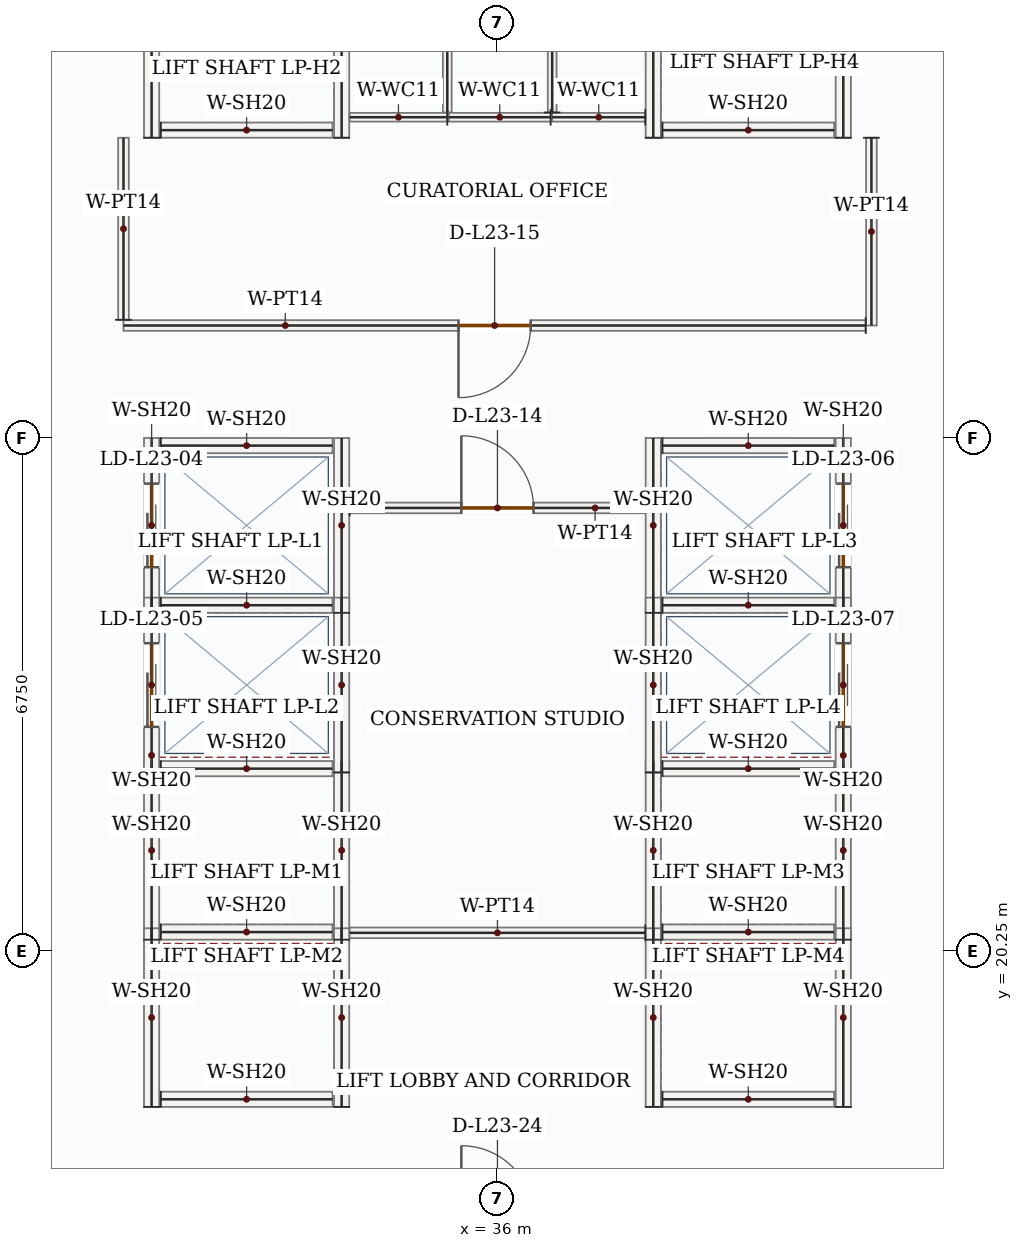
"""IFC4 building model, lengths in metres.
Left out: names, types, materials, properties, quantities, classifications, styles, units other than length and angle.
Written with IfcOpenShell. Run it as: python <this file> out.ifc"""

import sys

from ifc_helpers import new_model, si_unit, direction, frame, frame_2d, origin, place, context, subcontext, project, spatial, rectangle, extrude, source, transform, mapped, element, fill, save


model = new_model("IFC4")
c1 = context("Model", 3, precision=1e-05, world=origin(), true_north=direction((0.0, 1.0)))
c2 = subcontext(c1, "Body", "Model", "MODEL_VIEW")
j1 = project(units=[si_unit("LENGTHUNIT", "METRE"), si_unit("PLANEANGLEUNIT", "RADIAN")], contexts=[c1])
p1 = place(None, origin())
s1 = spatial("IfcSite", under=j1, at=p1, CompositionType="ELEMENT")
p2 = place(p1, origin())
s2 = spatial("IfcBuilding", under=s1, at=p2, CompositionType="ELEMENT")
p3 = place(p2, frame((0.0, 0.0, 104.7)))
s3 = spatial("IfcBuildingStorey", under=s2, at=p3, CompositionType="ELEMENT", Elevation=104.7)
m1 = source(origin(), c2, "Body", "SweptSolid", [
    extrude(rectangle(XDim=2.4, YDim=0.2, at=frame_2d((1.2, 0.0))), origin(), (0.0, 0.0, 1.0), 3.95),
])
for number, where, z_axis, x_axis in (
    (1, (31.45, 30.95, 0.0), (0.0, 0.0, 1.0), (0.0, 1.0, 0.0)),
    (2, (33.95, 30.95, 0.0), (0.0, 0.0, 1.0), (0.0, 1.0, 0.0)),
):
    element("IfcWall", number, at=place(p3, frame(where, z_axis=z_axis, x_axis=x_axis)), inside=s3, PredefinedType="SOLIDWALL", context=c2, shape_type="MappedRepresentation", body=[
        mapped(m1, transform((0.0, 0.0, 0.0), x_axis=(1.0, 0.0, 0.0), y_axis=(0.0, 1.0, 0.0), z_axis=(0.0, 0.0, 1.0), scale=1.0)),
    ])
m2 = source(origin(), c2, "Body", "SweptSolid", [
    extrude(rectangle(XDim=2.26, YDim=0.2, at=frame_2d((1.13, 0.0))), origin(), (0.0, 0.0, 1.0), 3.95),
])
p4 = place(p3, frame((31.57, 31.05, 0.0), z_axis=(0.0, 0.0, 1.0), x_axis=(1.0, 0.0, 0.0)))
e3 = element("IfcWall", 3, at=p4, inside=s3, PredefinedType="SOLIDWALL", context=c2, shape_type="MappedRepresentation", body=[
    mapped(m2, transform((0.0, 0.0, 0.0), x_axis=(1.0, 0.0, 0.0), y_axis=(0.0, 1.0, 0.0), z_axis=(0.0, 0.0, 1.0), scale=1.0)),
])
for number, where, z_axis, x_axis in (
    (4, (38.05, 30.95, 0.0), (0.0, 0.0, 1.0), (0.0, 1.0, 0.0)),
    (5, (40.55, 30.95, 0.0), (0.0, 0.0, 1.0), (0.0, 1.0, 0.0)),
):
    element("IfcWall", number, at=place(p3, frame(where, z_axis=z_axis, x_axis=x_axis)), inside=s3, PredefinedType="SOLIDWALL", context=c2, shape_type="MappedRepresentation", body=[
        mapped(m1, transform((0.0, 0.0, 0.0), x_axis=(1.0, 0.0, 0.0), y_axis=(0.0, 1.0, 0.0), z_axis=(0.0, 0.0, 1.0), scale=1.0)),
    ])
p5 = place(p3, frame((38.17, 31.05, 0.0), z_axis=(0.0, 0.0, 1.0), x_axis=(1.0, 0.0, 0.0)))
e6 = element("IfcWall", 6, at=p5, inside=s3, PredefinedType="SOLIDWALL", context=c2, shape_type="MappedRepresentation", body=[
    mapped(m2, transform((0.0, 0.0, 0.0), x_axis=(1.0, 0.0, 0.0), y_axis=(0.0, 1.0, 0.0), z_axis=(0.0, 0.0, 1.0), scale=1.0)),
])
m3 = source(origin(), c2, "Body", "SweptSolid", [
    extrude(rectangle(XDim=2.35, YDim=0.2, at=frame_2d((1.175, 0.0))), origin(), (0.0, 0.0, 1.0), 3.95),
])
for number, where, z_axis, x_axis in (
    (7, (31.45, 20.4, 0.0), (0.0, 0.0, 1.0), (0.0, 1.0, 0.0)),
    (8, (33.95, 20.4, 0.0), (0.0, 0.0, 1.0), (0.0, 1.0, 0.0)),
):
    element("IfcWall", number, at=place(p3, frame(where, z_axis=z_axis, x_axis=x_axis)), inside=s3, PredefinedType="SOLIDWALL", context=c2, shape_type="MappedRepresentation", body=[
        mapped(m3, transform((0.0, 0.0, 0.0), x_axis=(1.0, 0.0, 0.0), y_axis=(0.0, 1.0, 0.0), z_axis=(0.0, 0.0, 1.0), scale=1.0)),
    ])
for number, where, z_axis, x_axis in (
    (9, (31.57, 20.5, 0.0), (0.0, 0.0, 1.0), (1.0, 0.0, 0.0)),
    (10, (31.57, 22.65, 0.0), (0.0, 0.0, 1.0), (1.0, 0.0, 0.0)),
):
    element("IfcWall", number, at=place(p3, frame(where, z_axis=z_axis, x_axis=x_axis)), inside=s3, PredefinedType="SOLIDWALL", context=c2, shape_type="MappedRepresentation", body=[
        mapped(m2, transform((0.0, 0.0, 0.0), x_axis=(1.0, 0.0, 0.0), y_axis=(0.0, 1.0, 0.0), z_axis=(0.0, 0.0, 1.0), scale=1.0)),
    ])
for number, where, z_axis, x_axis in (
    (11, (31.45, 18.2, 0.0), (0.0, 0.0, 1.0), (0.0, 1.0, 0.0)),
    (12, (33.95, 18.2, 0.0), (0.0, 0.0, 1.0), (0.0, 1.0, 0.0)),
):
    element("IfcWall", number, at=place(p3, frame(where, z_axis=z_axis, x_axis=x_axis)), inside=s3, PredefinedType="SOLIDWALL", context=c2, shape_type="MappedRepresentation", body=[
        mapped(m3, transform((0.0, 0.0, 0.0), x_axis=(1.0, 0.0, 0.0), y_axis=(0.0, 1.0, 0.0), z_axis=(0.0, 0.0, 1.0), scale=1.0)),
    ])
p6 = place(p3, frame((31.57, 18.3, 0.0), z_axis=(0.0, 0.0, 1.0), x_axis=(1.0, 0.0, 0.0)))
e13 = element("IfcWall", 13, at=p6, inside=s3, PredefinedType="SOLIDWALL", context=c2, shape_type="MappedRepresentation", body=[
    mapped(m2, transform((0.0, 0.0, 0.0), x_axis=(1.0, 0.0, 0.0), y_axis=(0.0, 1.0, 0.0), z_axis=(0.0, 0.0, 1.0), scale=1.0)),
])
for number, where, z_axis, x_axis in (
    (14, (38.05, 20.4, 0.0), (0.0, 0.0, 1.0), (0.0, 1.0, 0.0)),
    (15, (40.55, 20.4, 0.0), (0.0, 0.0, 1.0), (0.0, 1.0, 0.0)),
):
    element("IfcWall", number, at=place(p3, frame(where, z_axis=z_axis, x_axis=x_axis)), inside=s3, PredefinedType="SOLIDWALL", context=c2, shape_type="MappedRepresentation", body=[
        mapped(m3, transform((0.0, 0.0, 0.0), x_axis=(1.0, 0.0, 0.0), y_axis=(0.0, 1.0, 0.0), z_axis=(0.0, 0.0, 1.0), scale=1.0)),
    ])
for number, where, z_axis, x_axis in (
    (16, (38.17, 20.5, 0.0), (0.0, 0.0, 1.0), (1.0, 0.0, 0.0)),
    (17, (38.17, 22.65, 0.0), (0.0, 0.0, 1.0), (1.0, 0.0, 0.0)),
):
    element("IfcWall", number, at=place(p3, frame(where, z_axis=z_axis, x_axis=x_axis)), inside=s3, PredefinedType="SOLIDWALL", context=c2, shape_type="MappedRepresentation", body=[
        mapped(m2, transform((0.0, 0.0, 0.0), x_axis=(1.0, 0.0, 0.0), y_axis=(0.0, 1.0, 0.0), z_axis=(0.0, 0.0, 1.0), scale=1.0)),
    ])
for number, where, z_axis, x_axis in (
    (18, (38.05, 18.2, 0.0), (0.0, 0.0, 1.0), (0.0, 1.0, 0.0)),
    (19, (40.55, 18.2, 0.0), (0.0, 0.0, 1.0), (0.0, 1.0, 0.0)),
):
    element("IfcWall", number, at=place(p3, frame(where, z_axis=z_axis, x_axis=x_axis)), inside=s3, PredefinedType="SOLIDWALL", context=c2, shape_type="MappedRepresentation", body=[
        mapped(m3, transform((0.0, 0.0, 0.0), x_axis=(1.0, 0.0, 0.0), y_axis=(0.0, 1.0, 0.0), z_axis=(0.0, 0.0, 1.0), scale=1.0)),
    ])
p7 = place(p3, frame((38.17, 18.3, 0.0), z_axis=(0.0, 0.0, 1.0), x_axis=(1.0, 0.0, 0.0)))
e20 = element("IfcWall", 20, at=p7, inside=s3, PredefinedType="SOLIDWALL", context=c2, shape_type="MappedRepresentation", body=[
    mapped(m2, transform((0.0, 0.0, 0.0), x_axis=(1.0, 0.0, 0.0), y_axis=(0.0, 1.0, 0.0), z_axis=(0.0, 0.0, 1.0), scale=1.0)),
])
p8 = place(p3, frame((31.45, 24.7, 0.0), z_axis=(0.0, 0.0, 1.0), x_axis=(0.0, 1.0, 0.0)))
e21 = element("IfcWall", 21, at=p8, inside=s3, PredefinedType="SOLIDWALL", context=c2, shape_type="SweptSolid", body=[
    extrude(rectangle(XDim=2.3, YDim=0.2, at=frame_2d((1.15, 0.0))), origin(), (0.0, 0.0, 1.0), 3.95),
])
p9 = place(p8, frame((0.6, 0.0, 0.0)))
e22 = element("IfcOpeningElement", 22, at=p9, cuts=e21, PredefinedType="OPENING", context=c2, shape_type="SweptSolid", body=[
    extrude(rectangle(XDim=1.1, YDim=2.15, at=frame_2d((0.55, 1.075))), frame((0.0, 0.11, 0.0), z_axis=(0.0, -1.0, 0.0), x_axis=(1.0, 0.0, 0.0)), (0.0, 0.0, 1.0), 0.22),
])
m4 = source(origin(), c2, "Body", "SweptSolid", [
    extrude(rectangle(XDim=2.3, YDim=0.2, at=frame_2d((1.15, 0.0))), origin(), (0.0, 0.0, 1.0), 3.95),
])
p10 = place(p3, frame((33.95, 24.7, 0.0), z_axis=(0.0, 0.0, 1.0), x_axis=(0.0, 1.0, 0.0)))
e23 = element("IfcWall", 23, at=p10, inside=s3, PredefinedType="SOLIDWALL", context=c2, shape_type="MappedRepresentation", body=[
    mapped(m4, transform((0.0, 0.0, 0.0), x_axis=(1.0, 0.0, 0.0), y_axis=(0.0, 1.0, 0.0), z_axis=(0.0, 0.0, 1.0), scale=1.0)),
])
for number, where, z_axis, x_axis in (
    (24, (31.57, 24.8, 0.0), (0.0, 0.0, 1.0), (1.0, 0.0, 0.0)),
    (25, (31.57, 26.9, 0.0), (0.0, 0.0, 1.0), (1.0, 0.0, 0.0)),
):
    element("IfcWall", number, at=place(p3, frame(where, z_axis=z_axis, x_axis=x_axis)), inside=s3, PredefinedType="SOLIDWALL", context=c2, shape_type="MappedRepresentation", body=[
        mapped(m2, transform((0.0, 0.0, 0.0), x_axis=(1.0, 0.0, 0.0), y_axis=(0.0, 1.0, 0.0), z_axis=(0.0, 0.0, 1.0), scale=1.0)),
    ])
p11 = place(p3, frame((31.45, 22.6, 0.0), z_axis=(0.0, 0.0, 1.0), x_axis=(0.0, 1.0, 0.0)))
e26 = element("IfcWall", 26, at=p11, inside=s3, PredefinedType="SOLIDWALL", context=c2, shape_type="SweptSolid", body=[
    extrude(rectangle(XDim=2.3, YDim=0.2, at=frame_2d((1.15, 0.0))), origin(), (0.0, 0.0, 1.0), 3.95),
])
p12 = place(p11, frame((0.6, 0.0, 0.0)))
e27 = element("IfcOpeningElement", 27, at=p12, cuts=e26, PredefinedType="OPENING", context=c2, shape_type="SweptSolid", body=[
    extrude(rectangle(XDim=1.1, YDim=2.15, at=frame_2d((0.55, 1.075))), frame((0.0, 0.11, 0.0), z_axis=(0.0, -1.0, 0.0), x_axis=(1.0, 0.0, 0.0)), (0.0, 0.0, 1.0), 0.22),
])
m5 = source(origin(), c2, "Body", "SweptSolid", [
    extrude(rectangle(XDim=2.3, YDim=0.2, at=frame_2d((1.15, 0.0))), origin(), (0.0, 0.0, 1.0), 3.95),
])
p13 = place(p3, frame((33.95, 22.6, 0.0), z_axis=(0.0, 0.0, 1.0), x_axis=(0.0, 1.0, 0.0)))
e28 = element("IfcWall", 28, at=p13, inside=s3, PredefinedType="SOLIDWALL", context=c2, shape_type="MappedRepresentation", body=[
    mapped(m5, transform((0.0, 0.0, 0.0), x_axis=(1.0, 0.0, 0.0), y_axis=(0.0, 1.0, 0.0), z_axis=(0.0, 0.0, 1.0), scale=1.0)),
])
p14 = place(p3, frame((38.05, 24.7, 0.0), z_axis=(0.0, 0.0, 1.0), x_axis=(0.0, 1.0, 0.0)))
e29 = element("IfcWall", 29, at=p14, inside=s3, PredefinedType="SOLIDWALL", context=c2, shape_type="MappedRepresentation", body=[
    mapped(m4, transform((0.0, 0.0, 0.0), x_axis=(1.0, 0.0, 0.0), y_axis=(0.0, 1.0, 0.0), z_axis=(0.0, 0.0, 1.0), scale=1.0)),
])
p15 = place(p3, frame((40.55, 24.7, 0.0), z_axis=(0.0, 0.0, 1.0), x_axis=(0.0, 1.0, 0.0)))
e30 = element("IfcWall", 30, at=p15, inside=s3, PredefinedType="SOLIDWALL", context=c2, shape_type="SweptSolid", body=[
    extrude(rectangle(XDim=2.3, YDim=0.2, at=frame_2d((1.15, 0.0))), origin(), (0.0, 0.0, 1.0), 3.95),
])
p16 = place(p15, frame((0.6, 0.0, 0.0)))
e31 = element("IfcOpeningElement", 31, at=p16, cuts=e30, PredefinedType="OPENING", context=c2, shape_type="SweptSolid", body=[
    extrude(rectangle(XDim=1.1, YDim=2.15, at=frame_2d((0.55, 1.075))), frame((0.0, 0.11, 0.0), z_axis=(0.0, -1.0, 0.0), x_axis=(1.0, 0.0, 0.0)), (0.0, 0.0, 1.0), 0.22),
])
for number, where, z_axis, x_axis in (
    (32, (38.17, 24.8, 0.0), (0.0, 0.0, 1.0), (1.0, 0.0, 0.0)),
    (33, (38.17, 26.9, 0.0), (0.0, 0.0, 1.0), (1.0, 0.0, 0.0)),
):
    element("IfcWall", number, at=place(p3, frame(where, z_axis=z_axis, x_axis=x_axis)), inside=s3, PredefinedType="SOLIDWALL", context=c2, shape_type="MappedRepresentation", body=[
        mapped(m2, transform((0.0, 0.0, 0.0), x_axis=(1.0, 0.0, 0.0), y_axis=(0.0, 1.0, 0.0), z_axis=(0.0, 0.0, 1.0), scale=1.0)),
    ])
p17 = place(p3, frame((38.05, 22.6, 0.0), z_axis=(0.0, 0.0, 1.0), x_axis=(0.0, 1.0, 0.0)))
e34 = element("IfcWall", 34, at=p17, inside=s3, PredefinedType="SOLIDWALL", context=c2, shape_type="MappedRepresentation", body=[
    mapped(m5, transform((0.0, 0.0, 0.0), x_axis=(1.0, 0.0, 0.0), y_axis=(0.0, 1.0, 0.0), z_axis=(0.0, 0.0, 1.0), scale=1.0)),
])
p18 = place(p3, frame((40.55, 22.6, 0.0), z_axis=(0.0, 0.0, 1.0), x_axis=(0.0, 1.0, 0.0)))
e35 = element("IfcWall", 35, at=p18, inside=s3, PredefinedType="SOLIDWALL", context=c2, shape_type="SweptSolid", body=[
    extrude(rectangle(XDim=2.3, YDim=0.2, at=frame_2d((1.15, 0.0))), origin(), (0.0, 0.0, 1.0), 3.95),
])
p19 = place(p18, frame((0.6, 0.0, 0.0)))
e36 = element("IfcOpeningElement", 36, at=p19, cuts=e35, PredefinedType="OPENING", context=c2, shape_type="SweptSolid", body=[
    extrude(rectangle(XDim=1.1, YDim=2.15, at=frame_2d((0.55, 1.075))), frame((0.0, 0.11, 0.0), z_axis=(0.0, -1.0, 0.0), x_axis=(1.0, 0.0, 0.0)), (0.0, 0.0, 1.0), 0.22),
])
m6 = source(origin(), c2, "Body", "SweptSolid", [
    extrude(rectangle(XDim=1.225, YDim=0.115, at=frame_2d((0.613, 0.0))), origin(), (0.0, 0.0, 1.0), 3.95),
])
p20 = place(p3, frame((37.945, 31.22, 0.0), z_axis=(0.0, 0.0, 1.0), x_axis=(-1.0, 0.0, 0.0)))
e37 = element("IfcWall", 37, at=p20, inside=s3, PredefinedType="PARTITIONING", context=c2, shape_type="MappedRepresentation", body=[
    mapped(m6, transform((0.0, 0.0, 0.0), x_axis=(1.0, 0.0, 0.0), y_axis=(0.0, 1.0, 0.0), z_axis=(0.0, 0.0, 1.0), scale=1.0)),
])
m7 = source(origin(), c2, "Body", "SweptSolid", [
    extrude(rectangle(XDim=3.998, YDim=0.115, at=frame_2d((1.999, 0.0))), origin(), (0.0, 0.0, 1.0), 3.95),
])
p21 = place(p3, frame((36.72, 31.282, 0.0), z_axis=(0.0, 0.0, 1.0), x_axis=(0.0, 1.0, 0.0)))
e38 = element("IfcWall", 38, at=p21, inside=s3, PredefinedType="PARTITIONING", context=c2, shape_type="MappedRepresentation", body=[
    mapped(m7, transform((0.0, 0.0, 0.0), x_axis=(1.0, 0.0, 0.0), y_axis=(0.0, 1.0, 0.0), z_axis=(0.0, 0.0, 1.0), scale=1.0)),
])
m8 = source(origin(), c2, "Body", "SweptSolid", [
    extrude(rectangle(XDim=1.285, YDim=0.115, at=frame_2d((0.643, 0.0))), origin(), (0.0, 0.0, 1.0), 3.95),
])
p22 = place(p3, frame((35.34, 31.22, 0.0), z_axis=(0.0, 0.0, 1.0), x_axis=(-1.0, 0.0, 0.0)))
e39 = element("IfcWall", 39, at=p22, inside=s3, PredefinedType="PARTITIONING", context=c2, shape_type="MappedRepresentation", body=[
    mapped(m8, transform((0.0, 0.0, 0.0), x_axis=(1.0, 0.0, 0.0), y_axis=(0.0, 1.0, 0.0), z_axis=(0.0, 0.0, 1.0), scale=1.0)),
])
m9 = source(origin(), c2, "Body", "SweptSolid", [
    extrude(rectangle(XDim=3.935, YDim=0.115, at=frame_2d((1.968, 0.0))), origin(), (0.0, 0.0, 1.0), 3.95),
])
p23 = place(p3, frame((35.34, 35.218, 0.0), z_axis=(0.0, 0.0, 1.0), x_axis=(0.0, -1.0, 0.0)))
e40 = element("IfcWall", 40, at=p23, inside=s3, PredefinedType="PARTITIONING", context=c2, shape_type="MappedRepresentation", body=[
    mapped(m9, transform((0.0, 0.0, 0.0), x_axis=(1.0, 0.0, 0.0), y_axis=(0.0, 1.0, 0.0), z_axis=(0.0, 0.0, 1.0), scale=1.0)),
])
m10 = source(origin(), c2, "Body", "SweptSolid", [
    extrude(rectangle(XDim=1.34, YDim=0.115, at=frame_2d((0.67, 0.0))), origin(), (0.0, 0.0, 1.0), 3.95),
])
p24 = place(p3, frame((36.7, 31.22, 0.0), z_axis=(0.0, 0.0, 1.0), x_axis=(-1.0, 0.0, 0.0)))
e41 = element("IfcWall", 41, at=p24, inside=s3, PredefinedType="PARTITIONING", context=c2, shape_type="MappedRepresentation", body=[
    mapped(m10, transform((0.0, 0.0, 0.0), x_axis=(1.0, 0.0, 0.0), y_axis=(0.0, 1.0, 0.0), z_axis=(0.0, 0.0, 1.0), scale=1.0)),
])
p25 = place(p3, frame((34.055, 26.08, 0.0), z_axis=(0.0, 0.0, 1.0), x_axis=(1.0, 0.0, 0.0)))
e42 = element("IfcWall", 42, at=p25, inside=s3, PredefinedType="PARTITIONING", context=c2, shape_type="SweptSolid", body=[
    extrude(rectangle(XDim=3.89, YDim=0.14, at=frame_2d((1.945, 0.0))), origin(), (0.0, 0.0, 1.0), 3.95),
])
p26 = place(p25, frame((1.47, 0.0, 0.0)))
e43 = element("IfcOpeningElement", 43, at=p26, cuts=e42, PredefinedType="OPENING", context=c2, shape_type="SweptSolid", body=[
    extrude(rectangle(XDim=0.95, YDim=2.15, at=frame_2d((0.475, 1.075))), frame((0.0, 0.08, 0.0), z_axis=(0.0, -1.0, 0.0), x_axis=(1.0, 0.0, 0.0)), (0.0, 0.0, 1.0), 0.16),
])
m11 = source(origin(), c2, "Body", "SweptSolid", [
    extrude(rectangle(XDim=3.89, YDim=0.14, at=frame_2d((1.945, 0.0))), origin(), (0.0, 0.0, 1.0), 3.95),
])
p27 = place(p3, frame((37.945, 20.49, 0.0), z_axis=(0.0, 0.0, 1.0), x_axis=(-1.0, 0.0, 0.0)))
e44 = element("IfcWall", 44, at=p27, inside=s3, PredefinedType="PARTITIONING", context=c2, shape_type="MappedRepresentation", body=[
    mapped(m11, transform((0.0, 0.0, 0.0), x_axis=(1.0, 0.0, 0.0), y_axis=(0.0, 1.0, 0.0), z_axis=(0.0, 0.0, 1.0), scale=1.0)),
])
m12 = source(origin(), c2, "Body", "SweptSolid", [
    extrude(rectangle(XDim=2.47, YDim=0.14, at=frame_2d((1.235, 0.0))), origin(), (0.0, 0.0, 1.0), 3.95),
])
p28 = place(p3, frame((40.92, 30.95, 0.0), z_axis=(0.0, 0.0, 1.0), x_axis=(0.0, -1.0, 0.0)))
e45 = element("IfcWall", 45, at=p28, inside=s3, PredefinedType="PARTITIONING", context=c2, shape_type="MappedRepresentation", body=[
    mapped(m12, transform((0.0, 0.0, 0.0), x_axis=(1.0, 0.0, 0.0), y_axis=(0.0, 1.0, 0.0), z_axis=(0.0, 0.0, 1.0), scale=1.0)),
])
p29 = place(p3, frame((40.845, 28.48, 0.0), z_axis=(0.0, 0.0, 1.0), x_axis=(-1.0, 0.0, 0.0)))
e46 = element("IfcWall", 46, at=p29, inside=s3, PredefinedType="PARTITIONING", context=c2, shape_type="SweptSolid", body=[
    extrude(rectangle(XDim=9.765, YDim=0.14, at=frame_2d((4.882, 0.0))), origin(), (0.0, 0.0, 1.0), 3.95),
])
p30 = place(p29, frame((4.407, 0.0, 0.0)))
e47 = element("IfcOpeningElement", 47, at=p30, cuts=e46, PredefinedType="OPENING", context=c2, shape_type="SweptSolid", body=[
    extrude(rectangle(XDim=0.95, YDim=2.15, at=frame_2d((0.475, 1.075))), frame((0.0, 0.08, 0.0), z_axis=(0.0, -1.0, 0.0), x_axis=(1.0, 0.0, 0.0)), (0.0, 0.0, 1.0), 0.16),
])
m13 = source(origin(), c2, "Body", "SweptSolid", [
    extrude(rectangle(XDim=2.395, YDim=0.14, at=frame_2d((1.198, 0.0))), origin(), (0.0, 0.0, 1.0), 3.95),
])
p31 = place(p3, frame((31.08, 28.555, 0.0), z_axis=(0.0, 0.0, 1.0), x_axis=(0.0, 1.0, 0.0)))
e48 = element("IfcWall", 48, at=p31, inside=s3, PredefinedType="PARTITIONING", context=c2, shape_type="MappedRepresentation", body=[
    mapped(m13, transform((0.0, 0.0, 0.0), x_axis=(1.0, 0.0, 0.0), y_axis=(0.0, 1.0, 0.0), z_axis=(0.0, 0.0, 1.0), scale=1.0)),
])
m14 = source(origin(), c2, "Body", "SweptSolid", [
    extrude(rectangle(XDim=1.1, YDim=2.15, at=frame_2d((0.55, 1.075))), frame((0.0, 0.025, 0.0), z_axis=(0.0, -1.0, 0.0), x_axis=(1.0, 0.0, 0.0)), (0.0, 0.0, 1.0), 0.05),
])
p32 = place(p9, origin())
e49 = element("IfcDoor", 49, at=p32, inside=s3, OperationType="DOUBLE_DOOR_SLIDING", PredefinedType="DOOR", context=c2, shape_type="MappedRepresentation", body=[
    mapped(m14, transform((0.0, 0.0, 0.0), x_axis=(1.0, 0.0, 0.0), y_axis=(0.0, 1.0, 0.0), z_axis=(0.0, 0.0, 1.0), scale=1.0)),
])
fill(e22, e49)
p33 = place(p12, origin())
e50 = element("IfcDoor", 50, at=p33, inside=s3, OperationType="DOUBLE_DOOR_SLIDING", PredefinedType="DOOR", context=c2, shape_type="MappedRepresentation", body=[
    mapped(m14, transform((0.0, 0.0, 0.0), x_axis=(1.0, 0.0, 0.0), y_axis=(0.0, 1.0, 0.0), z_axis=(0.0, 0.0, 1.0), scale=1.0)),
])
fill(e27, e50)
p34 = place(p16, origin())
e51 = element("IfcDoor", 51, at=p34, inside=s3, OperationType="DOUBLE_DOOR_SLIDING", PredefinedType="DOOR", context=c2, shape_type="MappedRepresentation", body=[
    mapped(m14, transform((0.0, 0.0, 0.0), x_axis=(1.0, 0.0, 0.0), y_axis=(0.0, 1.0, 0.0), z_axis=(0.0, 0.0, 1.0), scale=1.0)),
])
fill(e31, e51)
p35 = place(p19, origin())
e52 = element("IfcDoor", 52, at=p35, inside=s3, OperationType="DOUBLE_DOOR_SLIDING", PredefinedType="DOOR", context=c2, shape_type="MappedRepresentation", body=[
    mapped(m14, transform((0.0, 0.0, 0.0), x_axis=(1.0, 0.0, 0.0), y_axis=(0.0, 1.0, 0.0), z_axis=(0.0, 0.0, 1.0), scale=1.0)),
])
fill(e36, e52)
m15 = source(origin(), c2, "Body", "SweptSolid", [
    extrude(rectangle(XDim=0.95, YDim=2.15, at=frame_2d((0.475, 1.075))), frame((0.0, 0.025, 0.0), z_axis=(0.0, -1.0, 0.0), x_axis=(1.0, 0.0, 0.0)), (0.0, 0.0, 1.0), 0.05),
])
p36 = place(p26, origin())
e53 = element("IfcDoor", 53, at=p36, inside=s3, OperationType="SINGLE_SWING_LEFT", PredefinedType="DOOR", context=c2, shape_type="MappedRepresentation", body=[
    mapped(m15, transform((0.0, 0.0, 0.0), x_axis=(1.0, 0.0, 0.0), y_axis=(0.0, 1.0, 0.0), z_axis=(0.0, 0.0, 1.0), scale=1.0)),
])
fill(e43, e53)
p37 = place(p30, origin())
e54 = element("IfcDoor", 54, at=p37, inside=s3, OperationType="SINGLE_SWING_RIGHT", PredefinedType="DOOR", context=c2, shape_type="MappedRepresentation", body=[
    mapped(m15, transform((0.0, 0.0, 0.0), x_axis=(1.0, 0.0, 0.0), y_axis=(0.0, 1.0, 0.0), z_axis=(0.0, 0.0, 1.0), scale=1.0)),
])
fill(e47, e54)
save(model, sys.argv[1])
